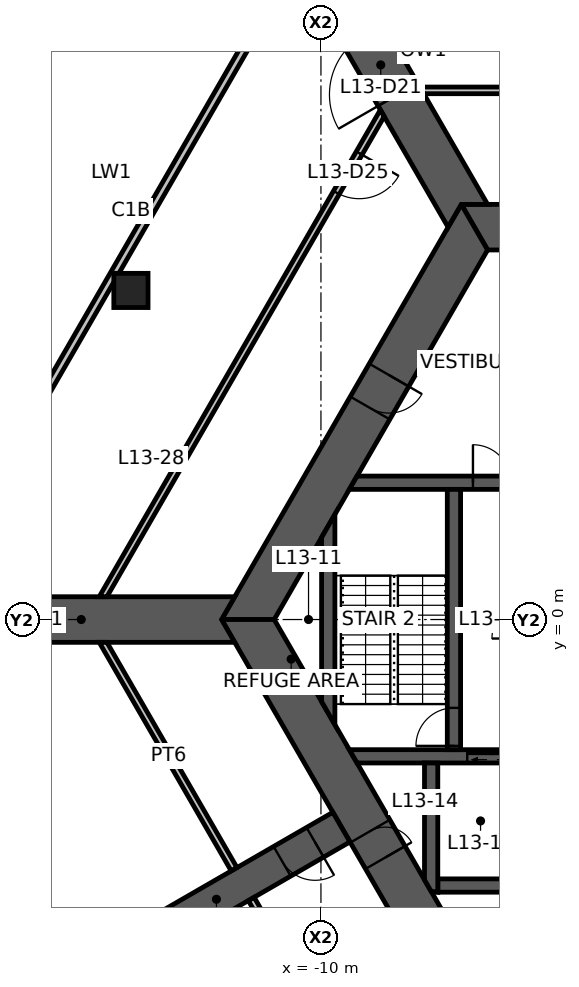
"""IFC4 building model, lengths in metres.
Left out: names, types, materials, properties, quantities, classifications, styles, units other than length and angle.
Written with IfcOpenShell. Run it as: python <this file> out.ifc"""

import sys

from ifc_helpers import new_model, si_unit, direction, frame, frame_2d, origin, origin_2d, place, context, subcontext, project, spatial, polyline, rectangle, hollow_rectangle, outline, extrude, element, fill, save


model = new_model("IFC4")
c1 = context("Model", 3, precision=1e-05, world=origin(), true_north=direction((0.0, 1.0)))
c2 = subcontext(c1, "Body", "Model", "MODEL_VIEW")
j1 = project(units=[si_unit("LENGTHUNIT", "METRE"), si_unit("PLANEANGLEUNIT", "RADIAN")], contexts=[c1])
p1 = place(None, origin())
s1 = spatial("IfcSite", under=j1, at=p1, CompositionType="ELEMENT")
p2 = place(p1, origin())
s2 = spatial("IfcBuilding", under=s1, at=p2, CompositionType="ELEMENT")
p3 = place(p2, frame((0.0, 0.0, 52.0)))
s3 = spatial("IfcBuildingStorey", under=s2, at=p3, CompositionType="ELEMENT", Elevation=52.0)
p4 = place(p3, frame((-15.0, 8.66, 0.0), z_axis=(0.0, 0.0, 1.0), x_axis=(1.0, 0.0, 0.0)))
e1 = element("IfcColumn", 1, at=p4, inside=s3, PredefinedType="COLUMN", context=c2, shape_type="SweptSolid", body=[
    extrude(hollow_rectangle(XDim=0.9, YDim=0.9, WallThickness=0.05, at=origin_2d()), origin(), (0.0, 0.0, 1.0), 5.0),
])
p5 = place(p3, frame((5.961, 10.325, 0.0), z_axis=(0.0, 0.0, 1.0), x_axis=(-1.0, 0.0, 0.0)))
e2 = element("IfcWall", 2, at=p5, inside=s3, PredefinedType="SHEAR", context=c2, shape_type="SweptSolid", body=[
    extrude(outline(polyline([(-0.346, -0.6), (4.574, -0.6), (5.474, -0.6), (6.449, -0.6), (7.349, -0.6), (12.269, -0.6), (11.576, 0.6), (7.349, 0.6), (6.449, 0.6), (5.474, 0.6), (4.574, 0.6), (0.346, 0.6), (-0.346, -0.6)])), origin(), (0.0, 0.0, 1.0), 5.0),
])
p6 = place(p5, frame((6.449, 0.0, 0.0)))
e3 = element("IfcOpeningElement", 3, at=p6, cuts=e2, PredefinedType="OPENING", context=c2, shape_type="SweptSolid", body=[
    extrude(rectangle(XDim=0.9, YDim=2.1, at=frame_2d((0.45, 1.05))), frame((0.0, 0.61, 0.0), z_axis=(0.0, -1.0, 0.0), x_axis=(1.0, 0.0, 0.0)), (0.0, 0.0, 1.0), 1.22),
])
p7 = place(p5, frame((4.574, 0.0, 0.0)))
e4 = element("IfcOpeningElement", 4, at=p7, cuts=e2, PredefinedType="OPENING", context=c2, shape_type="SweptSolid", body=[
    extrude(rectangle(XDim=0.9, YDim=2.1, at=frame_2d((0.45, 1.05))), frame((0.0, 0.61, 0.0), z_axis=(0.0, -1.0, 0.0), x_axis=(1.0, 0.0, 0.0)), (0.0, 0.0, 1.0), 1.22),
])
p8 = place(p3, frame((-5.961, 10.325, 0.0), z_axis=(0.0, 0.0, 1.0), x_axis=(-0.500004296715, -0.866022923061, 0.0)))
e5 = element("IfcWall", 5, at=p8, inside=s3, PredefinedType="SHEAR", context=c2, shape_type="SweptSolid", body=[
    extrude(outline(polyline([(-0.346, -0.6), (4.494, -0.6), (5.494, -0.6), (12.269, -0.6), (11.576, 0.6), (5.494, 0.6), (4.494, 0.6), (0.346, 0.6), (-0.346, -0.6)])), origin(), (0.0, 0.0, 1.0), 5.0),
])
p9 = place(p8, frame((4.494, 0.0, 0.0)))
e6 = element("IfcOpeningElement", 6, at=p9, cuts=e5, PredefinedType="OPENING", context=c2, shape_type="SweptSolid", body=[
    extrude(rectangle(XDim=1.0, YDim=2.1, at=frame_2d((0.5, 1.05))), frame((0.0, 0.61, 0.0), z_axis=(0.0, -1.0, 0.0), x_axis=(1.0, 0.0, 0.0)), (0.0, 0.0, 1.0), 1.22),
])
p10 = place(p3, frame((-11.922, 0.0, 0.0), z_axis=(0.0, 0.0, 1.0), x_axis=(0.500004296715, -0.866022923061, 0.0)))
e7 = element("IfcWall", 7, at=p10, inside=s3, PredefinedType="SHEAR", context=c2, shape_type="SweptSolid", body=[
    extrude(outline(polyline([(-0.346, -0.6), (6.431, -0.6), (7.231, -0.6), (12.269, -0.6), (11.576, 0.6), (7.231, 0.6), (6.431, 0.6), (0.346, 0.6), (-0.346, -0.6)])), origin(), (0.0, 0.0, 1.0), 5.0),
])
p11 = place(p10, frame((6.431, 0.0, 0.0)))
e8 = element("IfcOpeningElement", 8, at=p11, cuts=e7, PredefinedType="OPENING", context=c2, shape_type="SweptSolid", body=[
    extrude(rectangle(XDim=0.8, YDim=2.1, at=frame_2d((0.4, 1.05))), frame((0.0, 0.61, 0.0), z_axis=(0.0, -1.0, 0.0), x_axis=(1.0, 0.0, 0.0)), (0.0, 0.0, 1.0), 1.22),
])
p12 = place(p3, frame((-9.461, -5.462, 0.0), z_axis=(0.0, 0.0, 1.0), x_axis=(-0.866019116917, -0.500010889016, 0.0)))
e9 = element("IfcWall", 9, at=p12, inside=s3, PredefinedType="SHEAR", context=c2, shape_type="SweptSolid", body=[
    extrude(rectangle(XDim=7.595, YDim=0.9, at=frame_2d((3.798, 0.0))), origin(), (0.0, 0.0, 1.0), 5.0),
])
p13 = place(p12, frame((0.8, 0.0, 0.0)))
e10 = element("IfcOpeningElement", 10, at=p13, cuts=e9, PredefinedType="OPENING", context=c2, shape_type="SweptSolid", body=[
    extrude(rectangle(XDim=1.0, YDim=2.1, at=frame_2d((0.5, 1.05))), frame((0.0, 0.46, 0.0), z_axis=(0.0, -1.0, 0.0), x_axis=(1.0, 0.0, 0.0)), (0.0, 0.0, 1.0), 0.92),
])
p14 = place(p3, frame((-6.308, 10.925, -1.15), z_axis=(0.0, 0.0, 1.0), x_axis=(-0.499993363642, 0.866029235253, 0.0)))
e11 = element("IfcWall", 11, at=p14, inside=s3, PredefinedType="SHEAR", context=c2, shape_type="SweptSolid", body=[
    extrude(outline(polyline([(-0.346, -0.6), (3.338, -0.6), (5.138, -0.6), (7.385, -0.6), (7.385, 0.6), (5.138, 0.6), (3.338, 0.6), (-0.346, 0.6), (0.0, 0.0), (-0.346, -0.6)])), origin(), (0.0, 0.0, 1.0), 6.15),
])
p15 = place(p14, frame((3.338, 0.0, 1.15)))
e12 = element("IfcOpeningElement", 12, at=p15, cuts=e11, PredefinedType="OPENING", context=c2, shape_type="SweptSolid", body=[
    extrude(rectangle(XDim=1.8, YDim=2.4, at=frame_2d((0.9, 1.2))), frame((0.0, 0.61, 0.0), z_axis=(0.0, -1.0, 0.0), x_axis=(1.0, 0.0, 0.0)), (0.0, 0.0, 1.0), 1.22),
])
p16 = place(p3, frame((-12.615, 0.0, -1.15), z_axis=(0.0, 0.0, 1.0), x_axis=(-1.0, 0.0, 0.0)))
e13 = element("IfcWall", 13, at=p16, inside=s3, PredefinedType="SHEAR", context=c2, shape_type="SweptSolid", body=[
    extrude(outline(polyline([(-0.346, -0.6), (7.385, -0.6), (7.385, 0.6), (-0.346, 0.6), (0.0, 0.0), (-0.346, -0.6)])), origin(), (0.0, 0.0, 1.0), 6.15),
])
p17 = place(p3, frame((-10.65, 17.395, 0.0), z_axis=(0.0, 0.0, 1.0), x_axis=(-0.499999841607, -0.866025495233, 0.0)))
e14 = element("IfcWall", 14, at=p17, inside=s3, PredefinedType="ELEMENTEDWALL", context=c2, shape_type="SweptSolid", body=[
    extrude(rectangle(XDim=19.479, YDim=0.2, at=frame_2d((9.739, 0.0))), origin(), (0.0, 0.0, 1.0), 5.0),
])
p18 = place(p3, frame((-9.151, 3.6, 0.0), z_axis=(0.0, 0.0, 1.0), x_axis=(1.0, 0.0, 0.0)))
e15 = element("IfcWall", 15, at=p18, inside=s3, PredefinedType="SHEAR", context=c2, shape_type="SweptSolid", body=[
    extrude(outline(polyline([(-0.101, -0.175), (3.151, -0.175), (4.151, -0.175), (7.726, -0.175), (7.726, 0.175), (4.151, 0.175), (3.151, 0.175), (0.101, 0.175), (-0.101, -0.175)])), origin(), (0.0, 0.0, 1.0), 5.0),
])
p19 = place(p18, frame((3.151, 0.0, 0.0)))
e16 = element("IfcOpeningElement", 16, at=p19, cuts=e15, PredefinedType="OPENING", context=c2, shape_type="SweptSolid", body=[
    extrude(rectangle(XDim=1.0, YDim=2.1, at=frame_2d((0.5, 1.05))), frame((0.0, 0.185, 0.0), z_axis=(0.0, -1.0, 0.0), x_axis=(1.0, 0.0, 0.0)), (0.0, 0.0, 1.0), 0.37),
])
p20 = place(p3, frame((-9.151, -3.6, 0.0), z_axis=(0.0, 0.0, 1.0), x_axis=(1.0, 0.0, 0.0)))
e17 = element("IfcWall", 17, at=p20, inside=s3, PredefinedType="SHEAR", context=c2, shape_type="SweptSolid", body=[
    extrude(outline(polyline([(0.101, -0.175), (3.001, -0.175), (4.301, -0.175), (7.726, -0.175), (7.726, 0.175), (4.301, 0.175), (3.001, 0.175), (-0.101, 0.175), (0.101, -0.175)])), origin(), (0.0, 0.0, 1.0), 5.0),
])
p21 = place(p20, frame((3.001, 0.0, 0.0)))
e18 = element("IfcOpeningElement", 18, at=p21, cuts=e17, PredefinedType="OPENING", context=c2, shape_type="SweptSolid", body=[
    extrude(rectangle(XDim=1.3, YDim=2.1, at=frame_2d((0.65, 1.05))), frame((0.0, 0.185, 0.0), z_axis=(0.0, -1.0, 0.0), x_axis=(1.0, 0.0, 0.0)), (0.0, 0.0, 1.0), 0.37),
])
p22 = place(p3, frame((-6.5, -3.425, 0.0), z_axis=(0.0, 0.0, 1.0), x_axis=(0.0, 1.0, 0.0)))
e19 = element("IfcWall", 19, at=p22, inside=s3, PredefinedType="SHEAR", context=c2, shape_type="SweptSolid", body=[
    extrude(rectangle(XDim=6.85, YDim=0.35, at=frame_2d((3.425, 0.0))), origin(), (0.0, 0.0, 1.0), 5.0),
])
p23 = place(p22, frame((0.1, 0.0, 0.0)))
e20 = element("IfcOpeningElement", 20, at=p23, cuts=e19, PredefinedType="OPENING", context=c2, shape_type="SweptSolid", body=[
    extrude(rectangle(XDim=1.0, YDim=2.1, at=frame_2d((0.5, 1.05))), frame((0.0, 0.185, 0.0), z_axis=(0.0, -1.0, 0.0), x_axis=(1.0, 0.0, 0.0)), (0.0, 0.0, 1.0), 0.37),
])
p24 = place(p3, frame((-6.925, -7.0, 0.0), z_axis=(0.0, 0.0, 1.0), x_axis=(1.0, 0.0, 0.0)))
e21 = element("IfcWall", 21, at=p24, inside=s3, PredefinedType="SHEAR", context=c2, shape_type="SweptSolid", body=[
    extrude(rectangle(XDim=2.25, YDim=0.35, at=frame_2d((1.125, 0.0))), origin(), (0.0, 0.0, 1.0), 5.0),
])
p25 = place(p3, frame((-7.1, -3.775, 0.0), z_axis=(0.0, 0.0, 1.0), x_axis=(0.0, -1.0, 0.0)))
e22 = element("IfcWall", 22, at=p25, inside=s3, PredefinedType="SHEAR", context=c2, shape_type="SweptSolid", body=[
    extrude(outline(polyline([(0.0, -0.175), (3.074, -0.175), (3.377, 0.0), (3.4, 0.175), (0.0, 0.175), (0.0, -0.175)])), origin(), (0.0, 0.0, 1.0), 5.0),
])
p26 = place(p3, frame((-9.808, -2.462, 0.0), z_axis=(0.0, 0.0, 1.0), x_axis=(0.0, 1.0, 0.0)))
e23 = element("IfcWall", 23, at=p26, inside=s3, PredefinedType="SHEAR", context=c2, shape_type="SweptSolid", body=[
    extrude(outline(polyline([(-0.303, -0.175), (5.228, -0.175), (4.621, 0.175), (0.303, 0.175), (-0.303, -0.175)])), origin(), (0.0, 0.0, 1.0), 5.0),
])
p27 = place(p3, frame((-0.455, 13.925, 0.0), z_axis=(0.0, 0.0, 1.0), x_axis=(-1.0, 0.0, 0.0)))
e24 = element("IfcWall", 24, at=p27, inside=s3, PredefinedType="PARTITIONING", context=c2, shape_type="SweptSolid", body=[
    extrude(outline(polyline([(0.0, -0.087), (1.9, -0.087), (3.1, -0.087), (6.942, -0.087), (6.841, 0.087), (3.1, 0.087), (1.9, 0.087), (0.0, 0.087), (0.0, -0.087)])), origin(), (0.0, 0.0, 1.0), 4.83),
])
p28 = place(p27, frame((1.9, 0.0, 0.0)))
e25 = element("IfcOpeningElement", 25, at=p28, cuts=e24, PredefinedType="OPENING", context=c2, shape_type="SweptSolid", body=[
    extrude(rectangle(XDim=1.2, YDim=2.1, at=frame_2d((0.6, 1.05))), frame((0.0, 0.098, 0.0), z_axis=(0.0, -1.0, 0.0), x_axis=(1.0, 0.0, 0.0)), (0.0, 0.0, 1.0), 0.195),
])
p29 = place(p3, frame((-8.386, 13.325, 0.0), z_axis=(0.0, 0.0, 1.0), x_axis=(-0.500011547171, -0.866018736919, 0.0)))
e26 = element("IfcWall", 26, at=p29, inside=s3, PredefinedType="PARTITIONING", context=c2, shape_type="SweptSolid", body=[
    extrude(outline(polyline([(-0.051, -0.087), (1.213, -0.087), (2.413, -0.087), (14.744, -0.087), (14.643, 0.087), (2.413, 0.087), (1.213, 0.087), (0.051, 0.087), (-0.051, -0.087)])), origin(), (0.0, 0.0, 1.0), 4.83),
])
p30 = place(p29, frame((1.213, 0.0, 0.0)))
e27 = element("IfcOpeningElement", 27, at=p30, cuts=e26, PredefinedType="OPENING", context=c2, shape_type="SweptSolid", body=[
    extrude(rectangle(XDim=1.2, YDim=2.1, at=frame_2d((0.6, 1.05))), frame((0.0, 0.098, 0.0), z_axis=(0.0, -1.0, 0.0), x_axis=(1.0, 0.0, 0.0)), (0.0, 0.0, 1.0), 0.195),
])
p31 = place(p3, frame((-15.733, -0.6, 0.0), z_axis=(0.0, 0.0, 1.0), x_axis=(0.500013761451, -0.866017458461, 0.0)))
e28 = element("IfcWall", 28, at=p31, inside=s3, PredefinedType="PARTITIONING", context=c2, shape_type="SweptSolid", body=[
    extrude(outline(polyline([(-0.051, -0.087), (6.892, -0.087), (6.892, 0.087), (0.051, 0.087), (-0.051, -0.087)])), origin(), (0.0, 0.0, 1.0), 4.83),
])
p32 = place(p3, frame((-11.832, -7.356, 0.0), z_axis=(0.0, 0.0, 1.0), x_axis=(0.49998719302, -0.866032797772, 0.0)))
e29 = element("IfcWall", 29, at=p32, inside=s3, PredefinedType="PARTITIONING", context=c2, shape_type="SweptSolid", body=[
    extrude(outline(polyline([(0.0, -0.087), (1.9, -0.087), (3.1, -0.087), (6.942, -0.087), (6.841, 0.087), (3.1, 0.087), (1.9, 0.087), (0.0, 0.087), (0.0, -0.087)])), origin(), (0.0, 0.0, 1.0), 4.83),
])
p33 = place(p32, frame((1.9, 0.0, 0.0)))
e30 = element("IfcOpeningElement", 30, at=p33, cuts=e29, PredefinedType="OPENING", context=c2, shape_type="SweptSolid", body=[
    extrude(rectangle(XDim=1.2, YDim=2.1, at=frame_2d((0.6, 1.05))), frame((0.0, 0.098, 0.0), z_axis=(0.0, -1.0, 0.0), x_axis=(1.0, 0.0, 0.0)), (0.0, 0.0, 1.0), 0.195),
])
p34 = place(p11, origin())
e31 = element("IfcDoor", 31, at=p34, inside=s3, OperationType="SINGLE_SWING_RIGHT", PredefinedType="DOOR", context=c2, shape_type="SweptSolid", body=[
    extrude(rectangle(XDim=0.8, YDim=2.1, at=frame_2d((0.4, 1.05))), frame((0.0, 0.025, 0.0), z_axis=(0.0, -1.0, 0.0), x_axis=(1.0, 0.0, 0.0)), (0.0, 0.0, 1.0), 0.05),
])
fill(e8, e31)
p35 = place(p9, origin())
e32 = element("IfcDoor", 32, at=p35, inside=s3, OperationType="SINGLE_SWING_LEFT", PredefinedType="DOOR", context=c2, shape_type="SweptSolid", body=[
    extrude(rectangle(XDim=1.0, YDim=2.1, at=frame_2d((0.5, 1.05))), frame((0.0, 0.025, 0.0), z_axis=(0.0, -1.0, 0.0), x_axis=(1.0, 0.0, 0.0)), (0.0, 0.0, 1.0), 0.05),
])
fill(e6, e32)
p36 = place(p23, origin())
e33 = element("IfcDoor", 33, at=p36, inside=s3, OperationType="SINGLE_SWING_LEFT", PredefinedType="DOOR", context=c2, shape_type="SweptSolid", body=[
    extrude(rectangle(XDim=1.0, YDim=2.1, at=frame_2d((0.5, 1.05))), frame((0.0, 0.025, 0.0), z_axis=(0.0, -1.0, 0.0), x_axis=(1.0, 0.0, 0.0)), (0.0, 0.0, 1.0), 0.05),
])
fill(e20, e33)
p37 = place(p19, origin())
e34 = element("IfcDoor", 34, at=p37, inside=s3, OperationType="SINGLE_SWING_LEFT", PredefinedType="DOOR", context=c2, shape_type="SweptSolid", body=[
    extrude(rectangle(XDim=1.0, YDim=2.1, at=frame_2d((0.5, 1.05))), frame((0.0, 0.025, 0.0), z_axis=(0.0, -1.0, 0.0), x_axis=(1.0, 0.0, 0.0)), (0.0, 0.0, 1.0), 0.05),
])
fill(e16, e34)
p38 = place(p13, origin())
e35 = element("IfcDoor", 35, at=p38, inside=s3, OperationType="SINGLE_SWING_LEFT", PredefinedType="DOOR", context=c2, shape_type="SweptSolid", body=[
    extrude(rectangle(XDim=1.0, YDim=2.1, at=frame_2d((0.5, 1.05))), frame((0.0, 0.025, 0.0), z_axis=(0.0, -1.0, 0.0), x_axis=(1.0, 0.0, 0.0)), (0.0, 0.0, 1.0), 0.05),
])
fill(e10, e35)
p39 = place(p15, origin())
e36 = element("IfcDoor", 36, at=p39, inside=s3, OperationType="DOUBLE_DOOR_SINGLE_SWING", PredefinedType="DOOR", context=c2, shape_type="SweptSolid", body=[
    extrude(rectangle(XDim=1.8, YDim=2.4, at=frame_2d((0.9, 1.2))), frame((0.0, 0.025, 0.0), z_axis=(0.0, -1.0, 0.0), x_axis=(1.0, 0.0, 0.0)), (0.0, 0.0, 1.0), 0.05),
])
fill(e12, e36)
p40 = place(p30, origin())
e37 = element("IfcDoor", 37, at=p40, inside=s3, OperationType="DOUBLE_DOOR_SINGLE_SWING", PredefinedType="DOOR", context=c2, shape_type="SweptSolid", body=[
    extrude(rectangle(XDim=1.2, YDim=2.1, at=frame_2d((0.6, 1.05))), frame((0.0, 0.025, 0.0), z_axis=(0.0, -1.0, 0.0), x_axis=(1.0, 0.0, 0.0)), (0.0, 0.0, 1.0), 0.05),
])
fill(e27, e37)
p41 = place(p21, origin())
e38 = element("IfcDoor", 38, at=p41, inside=s3, OperationType="DOUBLE_DOOR_SLIDING", PredefinedType="DOOR", context=c2, shape_type="SweptSolid", body=[
    extrude(rectangle(XDim=1.3, YDim=2.1, at=frame_2d((0.65, 1.05))), frame((0.0, 0.025, 0.0), z_axis=(0.0, -1.0, 0.0), x_axis=(1.0, 0.0, 0.0)), (0.0, 0.0, 1.0), 0.05),
])
fill(e18, e38)
save(model, sys.argv[1])
